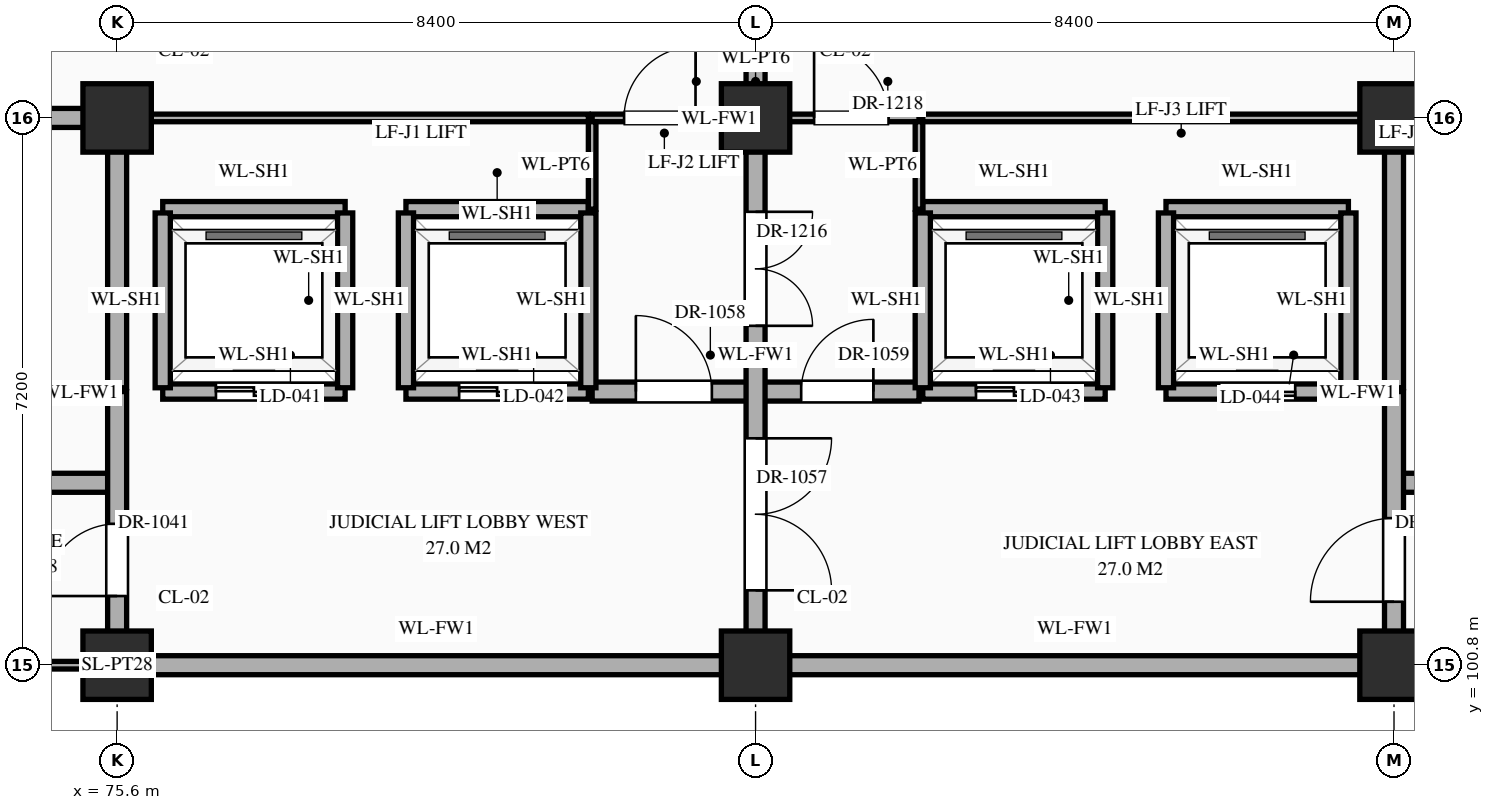
"""IFC4 building model, lengths in metres.
Left out: names, types, materials, properties, quantities, classifications, styles, units other than length and angle.
Written with IfcOpenShell. Run it as: python <this file> out.ifc"""

import sys

from ifc_helpers import new_model, si_unit, direction, frame, frame_2d, origin, origin_2d, place, context, subcontext, project, spatial, rectangle, extrude, element, fill, save


model = new_model("IFC4")
c1 = context("Model", 3, precision=1e-05, world=origin(), true_north=direction((0.0, 1.0)))
c2 = subcontext(c1, "Body", "Model", "MODEL_VIEW")
j1 = project(units=[si_unit("LENGTHUNIT", "METRE"), si_unit("PLANEANGLEUNIT", "RADIAN")], contexts=[c1])
p1 = place(None, origin())
s1 = spatial("IfcSite", under=j1, at=p1, CompositionType="ELEMENT")
p2 = place(p1, origin())
s2 = spatial("IfcBuilding", under=s1, at=p2, CompositionType="ELEMENT")
p3 = place(p2, frame((0.0, 0.0, 5.4)))
s3 = spatial("IfcBuildingStorey", under=s2, at=p3, CompositionType="ELEMENT", Elevation=5.4)
for number, where, z_axis, x_axis in (
    (1, (75.6, 100.8, 0.0), (0.0, 0.0, 1.0), (1.0, 0.0, 0.0)),
    (2, (75.6, 108.0, 0.0), (0.0, 0.0, 1.0), (1.0, 0.0, 0.0)),
    (3, (84.0, 100.8, 0.0), (0.0, 0.0, 1.0), (1.0, 0.0, 0.0)),
    (4, (84.0, 108.0, 0.0), (0.0, 0.0, 1.0), (1.0, 0.0, 0.0)),
    (5, (92.4, 100.8, 0.0), (0.0, 0.0, 1.0), (1.0, 0.0, 0.0)),
    (6, (92.4, 108.0, 0.0), (0.0, 0.0, 1.0), (1.0, 0.0, 0.0)),
):
    element("IfcColumn", number, at=place(p3, frame(where, z_axis=z_axis, x_axis=x_axis)), inside=s3, PredefinedType="COLUMN", context=c2, shape_type="SweptSolid", body=[
        extrude(rectangle(XDim=0.9, YDim=0.9, at=origin_2d()), origin(), (0.0, 0.0, 1.0), 5.4),
    ])
p4 = place(p3, frame((71.45, 100.8, 0.0), z_axis=(0.0, 0.0, 1.0), x_axis=(1.0, 0.0, 0.0)))
e7 = element("IfcWall", 7, at=p4, inside=s3, PredefinedType="STANDARD", context=c2, shape_type="SweptSolid", body=[
    extrude(rectangle(XDim=4.1, YDim=0.1, at=frame_2d((2.05, 0.0))), origin(), (0.0, 0.0, 1.0), 4.27),
])
for number, where, z_axis, x_axis in (
    (8, (75.65, 100.8, 0.0), (0.0, 0.0, 1.0), (1.0, 0.0, 0.0)),
    (9, (84.05, 100.8, 0.0), (0.0, 0.0, 1.0), (1.0, 0.0, 0.0)),
):
    element("IfcWall", number, at=place(p3, frame(where, z_axis=z_axis, x_axis=x_axis)), inside=s3, PredefinedType="STANDARD", context=c2, shape_type="SweptSolid", body=[
        extrude(rectangle(XDim=8.3, YDim=0.25, at=frame_2d((4.15, 0.0))), origin(), (0.0, 0.0, 1.0), 4.27),
    ])
p5 = place(p3, frame((92.45, 100.8, 0.0), z_axis=(0.0, 0.0, 1.0), x_axis=(1.0, 0.0, 0.0)))
e10 = element("IfcWall", 10, at=p5, inside=s3, PredefinedType="STANDARD", context=c2, shape_type="SweptSolid", body=[
    extrude(rectangle(XDim=4.1, YDim=0.1, at=frame_2d((2.05, 0.0))), origin(), (0.0, 0.0, 1.0), 4.27),
])
p6 = place(p3, frame((71.4, 103.2, 0.0), z_axis=(0.0, 0.0, 1.0), x_axis=(1.0, 0.0, 0.0)))
e11 = element("IfcWall", 11, at=p6, inside=s3, PredefinedType="STANDARD", context=c2, shape_type="SweptSolid", body=[
    extrude(rectangle(XDim=4.2, YDim=0.25, at=frame_2d((2.1, 0.0))), origin(), (0.0, 0.0, 1.0), 5.12),
])
p7 = place(p6, frame((1.6, 0.0, 0.0)))
e12 = element("IfcOpeningElement", 12, at=p7, cuts=e11, PredefinedType="OPENING", context=c2, shape_type="SweptSolid", body=[
    extrude(rectangle(XDim=1.0, YDim=2.2, at=frame_2d((0.5, 1.1))), frame((0.0, 0.137, 0.0), z_axis=(0.0, -1.0, 0.0), x_axis=(1.0, 0.0, 0.0)), (0.0, 0.0, 1.0), 0.274),
])
p8 = place(p3, frame((92.4, 103.2, 0.0), z_axis=(0.0, 0.0, 1.0), x_axis=(1.0, 0.0, 0.0)))
e13 = element("IfcWall", 13, at=p8, inside=s3, PredefinedType="STANDARD", context=c2, shape_type="SweptSolid", body=[
    extrude(rectangle(XDim=4.2, YDim=0.25, at=frame_2d((2.1, 0.0))), origin(), (0.0, 0.0, 1.0), 5.12),
])
p9 = place(p8, frame((1.6, 0.0, 0.0)))
e14 = element("IfcOpeningElement", 14, at=p9, cuts=e13, PredefinedType="OPENING", context=c2, shape_type="SweptSolid", body=[
    extrude(rectangle(XDim=1.0, YDim=2.2, at=frame_2d((0.5, 1.1))), frame((0.0, 0.137, 0.0), z_axis=(0.0, -1.0, 0.0), x_axis=(1.0, 0.0, 0.0)), (0.0, 0.0, 1.0), 0.274),
])
p10 = place(p3, frame((76.2, 104.4, 0.0), z_axis=(0.0, 0.0, 1.0), x_axis=(1.0, 0.0, 0.0)))
e15 = element("IfcWall", 15, at=p10, inside=s3, PredefinedType="STANDARD", context=c2, shape_type="SweptSolid", body=[
    extrude(rectangle(XDim=2.4, YDim=0.2, at=frame_2d((1.2, 0.0))), origin(), (0.0, 0.0, 1.0), 5.12),
])
p11 = place(p10, frame((0.7, 0.0, 0.0)))
e16 = element("IfcOpeningElement", 16, at=p11, cuts=e15, PredefinedType="OPENING", context=c2, shape_type="SweptSolid", body=[
    extrude(rectangle(XDim=1.0, YDim=2.15, at=frame_2d((0.5, 1.075))), frame((0.0, 0.112, 0.0), z_axis=(0.0, -1.0, 0.0), x_axis=(1.0, 0.0, 0.0)), (0.0, 0.0, 1.0), 0.224),
])
p12 = place(p3, frame((79.4, 104.4, 0.0), z_axis=(0.0, 0.0, 1.0), x_axis=(1.0, 0.0, 0.0)))
e17 = element("IfcWall", 17, at=p12, inside=s3, PredefinedType="STANDARD", context=c2, shape_type="SweptSolid", body=[
    extrude(rectangle(XDim=2.4, YDim=0.2, at=frame_2d((1.2, 0.0))), origin(), (0.0, 0.0, 1.0), 5.12),
])
p13 = place(p12, frame((0.7, 0.0, 0.0)))
e18 = element("IfcOpeningElement", 18, at=p13, cuts=e17, PredefinedType="OPENING", context=c2, shape_type="SweptSolid", body=[
    extrude(rectangle(XDim=1.0, YDim=2.15, at=frame_2d((0.5, 1.075))), frame((0.0, 0.112, 0.0), z_axis=(0.0, -1.0, 0.0), x_axis=(1.0, 0.0, 0.0)), (0.0, 0.0, 1.0), 0.224),
])
p14 = place(p3, frame((81.85, 104.4, 0.0), z_axis=(0.0, 0.0, 1.0), x_axis=(1.0, 0.0, 0.0)))
e19 = element("IfcWall", 19, at=p14, inside=s3, PredefinedType="STANDARD", context=c2, shape_type="SweptSolid", body=[
    extrude(rectangle(XDim=4.3, YDim=0.25, at=frame_2d((2.15, 0.0))), origin(), (0.0, 0.0, 1.0), 5.12),
])
p15 = place(p14, frame((0.575, 0.0, 0.0)))
e20 = element("IfcOpeningElement", 20, at=p15, cuts=e19, PredefinedType="OPENING", context=c2, shape_type="SweptSolid", body=[
    extrude(rectangle(XDim=1.0, YDim=2.2, at=frame_2d((0.5, 1.1))), frame((0.0, 0.137, 0.0), z_axis=(0.0, -1.0, 0.0), x_axis=(1.0, 0.0, 0.0)), (0.0, 0.0, 1.0), 0.274),
])
p16 = place(p14, frame((2.75, 0.0, 0.0)))
e21 = element("IfcOpeningElement", 21, at=p16, cuts=e19, PredefinedType="OPENING", context=c2, shape_type="SweptSolid", body=[
    extrude(rectangle(XDim=0.95, YDim=2.15, at=frame_2d((0.475, 1.075))), frame((0.0, 0.137, 0.0), z_axis=(0.0, -1.0, 0.0), x_axis=(1.0, 0.0, 0.0)), (0.0, 0.0, 1.0), 0.274),
])
p17 = place(p3, frame((86.2, 104.4, 0.0), z_axis=(0.0, 0.0, 1.0), x_axis=(1.0, 0.0, 0.0)))
e22 = element("IfcWall", 22, at=p17, inside=s3, PredefinedType="STANDARD", context=c2, shape_type="SweptSolid", body=[
    extrude(rectangle(XDim=2.4, YDim=0.2, at=frame_2d((1.2, 0.0))), origin(), (0.0, 0.0, 1.0), 5.12),
])
p18 = place(p17, frame((0.7, 0.0, 0.0)))
e23 = element("IfcOpeningElement", 23, at=p18, cuts=e22, PredefinedType="OPENING", context=c2, shape_type="SweptSolid", body=[
    extrude(rectangle(XDim=1.0, YDim=2.15, at=frame_2d((0.5, 1.075))), frame((0.0, 0.112, 0.0), z_axis=(0.0, -1.0, 0.0), x_axis=(1.0, 0.0, 0.0)), (0.0, 0.0, 1.0), 0.224),
])
p19 = place(p3, frame((89.4, 104.4, 0.0), z_axis=(0.0, 0.0, 1.0), x_axis=(1.0, 0.0, 0.0)))
e24 = element("IfcWall", 24, at=p19, inside=s3, PredefinedType="STANDARD", context=c2, shape_type="SweptSolid", body=[
    extrude(rectangle(XDim=2.4, YDim=0.2, at=frame_2d((1.2, 0.0))), origin(), (0.0, 0.0, 1.0), 5.12),
])
p20 = place(p19, frame((0.7, 0.0, 0.0)))
e25 = element("IfcOpeningElement", 25, at=p20, cuts=e24, PredefinedType="OPENING", context=c2, shape_type="SweptSolid", body=[
    extrude(rectangle(XDim=1.0, YDim=2.15, at=frame_2d((0.5, 1.075))), frame((0.0, 0.112, 0.0), z_axis=(0.0, -1.0, 0.0), x_axis=(1.0, 0.0, 0.0)), (0.0, 0.0, 1.0), 0.224),
])
for number, where, z_axis, x_axis in (
    (26, (76.2, 106.8, 0.0), (0.0, 0.0, 1.0), (1.0, 0.0, 0.0)),
    (27, (79.4, 106.8, 0.0), (0.0, 0.0, 1.0), (1.0, 0.0, 0.0)),
    (28, (86.2, 106.8, 0.0), (0.0, 0.0, 1.0), (1.0, 0.0, 0.0)),
    (29, (89.4, 106.8, 0.0), (0.0, 0.0, 1.0), (1.0, 0.0, 0.0)),
):
    element("IfcWall", number, at=place(p3, frame(where, z_axis=z_axis, x_axis=x_axis)), inside=s3, PredefinedType="STANDARD", context=c2, shape_type="SweptSolid", body=[
        extrude(rectangle(XDim=2.4, YDim=0.2, at=frame_2d((1.2, 0.0))), origin(), (0.0, 0.0, 1.0), 5.12),
    ])
p21 = place(p3, frame((71.4, 108.0, 0.0), z_axis=(0.0, 0.0, 1.0), x_axis=(1.0, 0.0, 0.0)))
e30 = element("IfcWall", 30, at=p21, inside=s3, PredefinedType="STANDARD", context=c2, shape_type="SweptSolid", body=[
    extrude(rectangle(XDim=4.2, YDim=0.25, at=frame_2d((2.1, 0.0))), origin(), (0.0, 0.0, 1.0), 4.27),
])
p22 = place(p21, frame((1.365, 0.0, 0.0)))
e31 = element("IfcOpeningElement", 31, at=p22, cuts=e30, PredefinedType="OPENING", context=c2, shape_type="SweptSolid", body=[
    extrude(rectangle(XDim=1.1, YDim=2.2, at=frame_2d((0.55, 1.1))), frame((0.0, 0.137, 0.0), z_axis=(0.0, -1.0, 0.0), x_axis=(1.0, 0.0, 0.0)), (0.0, 0.0, 1.0), 0.274),
])
p23 = place(p3, frame((75.65, 108.0, 0.0), z_axis=(0.0, 0.0, 1.0), x_axis=(1.0, 0.0, 0.0)))
e32 = element("IfcWall", 32, at=p23, inside=s3, PredefinedType="STANDARD", context=c2, shape_type="SweptSolid", body=[
    extrude(rectangle(XDim=6.15, YDim=0.1, at=frame_2d((3.075, 0.0))), origin(), (0.0, 0.0, 1.0), 4.27),
])
p24 = place(p3, frame((81.85, 108.0, 0.0), z_axis=(0.0, 0.0, 1.0), x_axis=(1.0, 0.0, 0.0)))
e33 = element("IfcWall", 33, at=p24, inside=s3, PredefinedType="STANDARD", context=c2, shape_type="SweptSolid", body=[
    extrude(rectangle(XDim=4.3, YDim=0.1, at=frame_2d((2.15, 0.0))), origin(), (0.0, 0.0, 1.0), 4.27),
])
p25 = place(p24, frame((0.42, 0.0, 0.0)))
e34 = element("IfcOpeningElement", 34, at=p25, cuts=e33, PredefinedType="OPENING", context=c2, shape_type="SweptSolid", body=[
    extrude(rectangle(XDim=0.94, YDim=2.3, at=frame_2d((0.47, 1.15))), frame((0.0, 0.062, 0.0), z_axis=(0.0, -1.0, 0.0), x_axis=(1.0, 0.0, 0.0)), (0.0, 0.0, 1.0), 0.124),
])
p26 = place(p24, frame((2.92, 0.0, 0.0)))
e35 = element("IfcOpeningElement", 35, at=p26, cuts=e33, PredefinedType="OPENING", context=c2, shape_type="SweptSolid", body=[
    extrude(rectangle(XDim=0.98, YDim=2.35, at=frame_2d((0.49, 1.175))), frame((0.0, 0.062, 0.0), z_axis=(0.0, -1.0, 0.0), x_axis=(1.0, 0.0, 0.0)), (0.0, 0.0, 1.0), 0.124),
])
p27 = place(p3, frame((86.2, 108.0, 0.0), z_axis=(0.0, 0.0, 1.0), x_axis=(1.0, 0.0, 0.0)))
e36 = element("IfcWall", 36, at=p27, inside=s3, PredefinedType="STANDARD", context=c2, shape_type="SweptSolid", body=[
    extrude(rectangle(XDim=6.15, YDim=0.1, at=frame_2d((3.075, 0.0))), origin(), (0.0, 0.0, 1.0), 4.27),
])
p28 = place(p3, frame((92.4, 108.0, 0.0), z_axis=(0.0, 0.0, 1.0), x_axis=(1.0, 0.0, 0.0)))
e37 = element("IfcWall", 37, at=p28, inside=s3, PredefinedType="STANDARD", context=c2, shape_type="SweptSolid", body=[
    extrude(rectangle(XDim=4.2, YDim=0.25, at=frame_2d((2.1, 0.0))), origin(), (0.0, 0.0, 1.0), 4.27),
])
p29 = place(p28, frame((1.785, 0.0, 0.0)))
e38 = element("IfcOpeningElement", 38, at=p29, cuts=e37, PredefinedType="OPENING", context=c2, shape_type="SweptSolid", body=[
    extrude(rectangle(XDim=1.0, YDim=2.2, at=frame_2d((0.5, 1.1))), frame((0.0, 0.137, 0.0), z_axis=(0.0, -1.0, 0.0), x_axis=(1.0, 0.0, 0.0)), (0.0, 0.0, 1.0), 0.274),
])
p30 = place(p3, frame((75.6, 100.8, 0.0), z_axis=(0.0, 0.0, 1.0), x_axis=(0.0, 1.0, 0.0)))
e39 = element("IfcWall", 39, at=p30, inside=s3, PredefinedType="STANDARD", context=c2, shape_type="SweptSolid", body=[
    extrude(rectangle(XDim=3.6, YDim=0.25, at=frame_2d((1.8, 0.0))), origin(), (0.0, 0.0, 1.0), 4.37),
])
p31 = place(p30, frame((0.91, 0.0, 0.0)))
e40 = element("IfcOpeningElement", 40, at=p31, cuts=e39, PredefinedType="OPENING", context=c2, shape_type="SweptSolid", body=[
    extrude(rectangle(XDim=0.95, YDim=2.15, at=frame_2d((0.475, 1.075))), frame((0.0, 0.137, 0.0), z_axis=(0.0, -1.0, 0.0), x_axis=(1.0, 0.0, 0.0)), (0.0, 0.0, 1.0), 0.274),
])
p32 = place(p3, frame((75.6, 104.45, 0.0), z_axis=(0.0, 0.0, 1.0), x_axis=(0.0, 1.0, 0.0)))
e41 = element("IfcWall", 41, at=p32, inside=s3, PredefinedType="STANDARD", context=c2, shape_type="SweptSolid", body=[
    extrude(rectangle(XDim=3.5, YDim=0.25, at=frame_2d((1.75, 0.0))), origin(), (0.0, 0.0, 1.0), 4.37),
])
for number, where, z_axis, x_axis in (
    (42, (76.2, 104.45, 0.0), (0.0, 0.0, 1.0), (0.0, 1.0, 0.0)),
    (43, (78.6, 104.45, 0.0), (0.0, 0.0, 1.0), (0.0, 1.0, 0.0)),
    (44, (79.4, 104.45, 0.0), (0.0, 0.0, 1.0), (0.0, 1.0, 0.0)),
    (45, (81.8, 104.45, 0.0), (0.0, 0.0, 1.0), (0.0, 1.0, 0.0)),
):
    element("IfcWall", number, at=place(p3, frame(where, z_axis=z_axis, x_axis=x_axis)), inside=s3, PredefinedType="STANDARD", context=c2, shape_type="SweptSolid", body=[
        extrude(rectangle(XDim=2.3, YDim=0.2, at=frame_2d((1.15, 0.0))), origin(), (0.0, 0.0, 1.0), 5.12),
    ])
p33 = place(p3, frame((81.85, 106.8, 0.0), z_axis=(0.0, 0.0, 1.0), x_axis=(0.0, 1.0, 0.0)))
e46 = element("IfcWall", 46, at=p33, inside=s3, PredefinedType="STANDARD", context=c2, shape_type="SweptSolid", body=[
    extrude(rectangle(XDim=1.15, YDim=0.1, at=frame_2d((0.575, 0.0))), origin(), (0.0, 0.0, 1.0), 5.12),
])
p34 = place(p3, frame((84.0, 100.8, 0.0), z_axis=(0.0, 0.0, 1.0), x_axis=(0.0, 1.0, 0.0)))
e47 = element("IfcWall", 47, at=p34, inside=s3, PredefinedType="STANDARD", context=c2, shape_type="SweptSolid", body=[
    extrude(rectangle(XDim=14.36, YDim=0.25, at=frame_2d((7.18, 0.0))), origin(), (0.0, 0.0, 1.0), 4.37),
])
p35 = place(p34, frame((0.985, 0.0, 0.0)))
e48 = element("IfcOpeningElement", 48, at=p35, cuts=e47, PredefinedType="OPENING", context=c2, shape_type="SweptSolid", body=[
    extrude(rectangle(XDim=2.0, YDim=2.4, at=frame_2d((1.0, 1.2))), frame((0.0, 0.137, 0.0), z_axis=(0.0, -1.0, 0.0), x_axis=(1.0, 0.0, 0.0)), (0.0, 0.0, 1.0), 0.274),
])
p36 = place(p34, frame((4.465, 0.0, 0.0)))
e49 = element("IfcOpeningElement", 49, at=p36, cuts=e47, PredefinedType="OPENING", context=c2, shape_type="SweptSolid", body=[
    extrude(rectangle(XDim=1.5, YDim=2.25, at=frame_2d((0.75, 1.125))), frame((0.0, 0.137, 0.0), z_axis=(0.0, -1.0, 0.0), x_axis=(1.0, 0.0, 0.0)), (0.0, 0.0, 1.0), 0.274),
])
p37 = place(p34, frame((8.035, 0.0, 0.0)))
e50 = element("IfcOpeningElement", 50, at=p37, cuts=e47, PredefinedType="OPENING", context=c2, shape_type="SweptSolid", body=[
    extrude(rectangle(XDim=1.1, YDim=2.2, at=frame_2d((0.55, 1.1))), frame((0.0, 0.137, 0.0), z_axis=(0.0, -1.0, 0.0), x_axis=(1.0, 0.0, 0.0)), (0.0, 0.0, 1.0), 0.274),
])
p38 = place(p3, frame((86.15, 106.8, 0.0), z_axis=(0.0, 0.0, 1.0), x_axis=(0.0, 1.0, 0.0)))
e51 = element("IfcWall", 51, at=p38, inside=s3, PredefinedType="STANDARD", context=c2, shape_type="SweptSolid", body=[
    extrude(rectangle(XDim=1.15, YDim=0.1, at=frame_2d((0.575, 0.0))), origin(), (0.0, 0.0, 1.0), 5.12),
])
for number, where, z_axis, x_axis in (
    (52, (86.2, 104.45, 0.0), (0.0, 0.0, 1.0), (0.0, 1.0, 0.0)),
    (53, (88.6, 104.45, 0.0), (0.0, 0.0, 1.0), (0.0, 1.0, 0.0)),
    (54, (89.4, 104.45, 0.0), (0.0, 0.0, 1.0), (0.0, 1.0, 0.0)),
    (55, (91.8, 104.45, 0.0), (0.0, 0.0, 1.0), (0.0, 1.0, 0.0)),
):
    element("IfcWall", number, at=place(p3, frame(where, z_axis=z_axis, x_axis=x_axis)), inside=s3, PredefinedType="STANDARD", context=c2, shape_type="SweptSolid", body=[
        extrude(rectangle(XDim=2.3, YDim=0.2, at=frame_2d((1.15, 0.0))), origin(), (0.0, 0.0, 1.0), 5.12),
    ])
p39 = place(p3, frame((92.4, 100.8, 0.0), z_axis=(0.0, 0.0, 1.0), x_axis=(0.0, 1.0, 0.0)))
e56 = element("IfcWall", 56, at=p39, inside=s3, PredefinedType="STANDARD", context=c2, shape_type="SweptSolid", body=[
    extrude(rectangle(XDim=3.6, YDim=0.25, at=frame_2d((1.8, 0.0))), origin(), (0.0, 0.0, 1.0), 4.37),
])
p40 = place(p39, frame((0.835, 0.0, 0.0)))
e57 = element("IfcOpeningElement", 57, at=p40, cuts=e56, PredefinedType="OPENING", context=c2, shape_type="SweptSolid", body=[
    extrude(rectangle(XDim=1.1, YDim=2.2, at=frame_2d((0.55, 1.1))), frame((0.0, 0.137, 0.0), z_axis=(0.0, -1.0, 0.0), x_axis=(1.0, 0.0, 0.0)), (0.0, 0.0, 1.0), 0.274),
])
p41 = place(p3, frame((92.4, 104.45, 0.0), z_axis=(0.0, 0.0, 1.0), x_axis=(0.0, 1.0, 0.0)))
e58 = element("IfcWall", 58, at=p41, inside=s3, PredefinedType="STANDARD", context=c2, shape_type="SweptSolid", body=[
    extrude(rectangle(XDim=3.5, YDim=0.25, at=frame_2d((1.75, 0.0))), origin(), (0.0, 0.0, 1.0), 4.37),
])
p42 = place(p11, origin())
e59 = element("IfcDoor", 59, at=p42, inside=s3, OperationType="DOUBLE_DOOR_SLIDING", PredefinedType="DOOR", context=c2, shape_type="SweptSolid", body=[
    extrude(rectangle(XDim=1.0, YDim=2.15, at=frame_2d((0.5, 1.075))), frame((0.0, 0.025, 0.0), z_axis=(0.0, -1.0, 0.0), x_axis=(1.0, 0.0, 0.0)), (0.0, 0.0, 1.0), 0.05),
])
fill(e16, e59)
p43 = place(p13, origin())
e60 = element("IfcDoor", 60, at=p43, inside=s3, OperationType="DOUBLE_DOOR_SLIDING", PredefinedType="DOOR", context=c2, shape_type="SweptSolid", body=[
    extrude(rectangle(XDim=1.0, YDim=2.15, at=frame_2d((0.5, 1.075))), frame((0.0, 0.025, 0.0), z_axis=(0.0, -1.0, 0.0), x_axis=(1.0, 0.0, 0.0)), (0.0, 0.0, 1.0), 0.05),
])
fill(e18, e60)
p44 = place(p18, origin())
e61 = element("IfcDoor", 61, at=p44, inside=s3, OperationType="DOUBLE_DOOR_SLIDING", PredefinedType="DOOR", context=c2, shape_type="SweptSolid", body=[
    extrude(rectangle(XDim=1.0, YDim=2.15, at=frame_2d((0.5, 1.075))), frame((0.0, 0.025, 0.0), z_axis=(0.0, -1.0, 0.0), x_axis=(1.0, 0.0, 0.0)), (0.0, 0.0, 1.0), 0.05),
])
fill(e23, e61)
p45 = place(p20, origin())
e62 = element("IfcDoor", 62, at=p45, inside=s3, OperationType="DOUBLE_DOOR_SLIDING", PredefinedType="DOOR", context=c2, shape_type="SweptSolid", body=[
    extrude(rectangle(XDim=1.0, YDim=2.15, at=frame_2d((0.5, 1.075))), frame((0.0, 0.025, 0.0), z_axis=(0.0, -1.0, 0.0), x_axis=(1.0, 0.0, 0.0)), (0.0, 0.0, 1.0), 0.05),
])
fill(e25, e62)
p46 = place(p31, origin())
e63 = element("IfcDoor", 63, at=p46, inside=s3, OperationType="SINGLE_SWING_LEFT", PredefinedType="DOOR", context=c2, shape_type="SweptSolid", body=[
    extrude(rectangle(XDim=0.95, YDim=2.15, at=frame_2d((0.475, 1.075))), frame((0.0, 0.025, 0.0), z_axis=(0.0, -1.0, 0.0), x_axis=(1.0, 0.0, 0.0)), (0.0, 0.0, 1.0), 0.05),
])
fill(e40, e63)
p47 = place(p40, origin())
e64 = element("IfcDoor", 64, at=p47, inside=s3, OperationType="SINGLE_SWING_LEFT", PredefinedType="DOOR", context=c2, shape_type="SweptSolid", body=[
    extrude(rectangle(XDim=1.1, YDim=2.2, at=frame_2d((0.55, 1.1))), frame((0.0, 0.025, 0.0), z_axis=(0.0, -1.0, 0.0), x_axis=(1.0, 0.0, 0.0)), (0.0, 0.0, 1.0), 0.05),
])
fill(e57, e64)
p48 = place(p35, frame((2.0, 0.0, 0.0), z_axis=(0.0, 0.0, 1.0), x_axis=(-1.0, 0.0, 0.0)))
e65 = element("IfcDoor", 65, at=p48, inside=s3, OperationType="DOUBLE_DOOR_SINGLE_SWING", PredefinedType="DOOR", context=c2, shape_type="SweptSolid", body=[
    extrude(rectangle(XDim=2.0, YDim=2.4, at=frame_2d((1.0, 1.2))), frame((0.0, 0.025, 0.0), z_axis=(0.0, -1.0, 0.0), x_axis=(1.0, 0.0, 0.0)), (0.0, 0.0, 1.0), 0.05),
])
fill(e48, e65)
p49 = place(p15, origin())
e66 = element("IfcDoor", 66, at=p49, inside=s3, OperationType="SINGLE_SWING_LEFT", PredefinedType="DOOR", context=c2, shape_type="SweptSolid", body=[
    extrude(rectangle(XDim=1.0, YDim=2.2, at=frame_2d((0.5, 1.1))), frame((0.0, 0.025, 0.0), z_axis=(0.0, -1.0, 0.0), x_axis=(1.0, 0.0, 0.0)), (0.0, 0.0, 1.0), 0.05),
])
fill(e20, e66)
p50 = place(p16, origin())
e67 = element("IfcDoor", 67, at=p50, inside=s3, OperationType="SINGLE_SWING_RIGHT", PredefinedType="DOOR", context=c2, shape_type="SweptSolid", body=[
    extrude(rectangle(XDim=0.95, YDim=2.15, at=frame_2d((0.475, 1.075))), frame((0.0, 0.025, 0.0), z_axis=(0.0, -1.0, 0.0), x_axis=(1.0, 0.0, 0.0)), (0.0, 0.0, 1.0), 0.05),
])
fill(e21, e67)
p51 = place(p36, frame((1.5, 0.0, 0.0), z_axis=(0.0, 0.0, 1.0), x_axis=(-1.0, 0.0, 0.0)))
e68 = element("IfcDoor", 68, at=p51, inside=s3, OperationType="DOUBLE_DOOR_SINGLE_SWING", PredefinedType="DOOR", context=c2, shape_type="SweptSolid", body=[
    extrude(rectangle(XDim=1.5, YDim=2.25, at=frame_2d((0.75, 1.125))), frame((0.0, 0.025, 0.0), z_axis=(0.0, -1.0, 0.0), x_axis=(1.0, 0.0, 0.0)), (0.0, 0.0, 1.0), 0.05),
])
fill(e49, e68)
p52 = place(p25, origin())
e69 = element("IfcDoor", 69, at=p52, inside=s3, OperationType="SINGLE_SWING_RIGHT", PredefinedType="DOOR", context=c2, shape_type="SweptSolid", body=[
    extrude(rectangle(XDim=0.94, YDim=2.3, at=frame_2d((0.47, 1.15))), frame((0.0, 0.025, 0.0), z_axis=(0.0, -1.0, 0.0), x_axis=(1.0, 0.0, 0.0)), (0.0, 0.0, 1.0), 0.05),
])
fill(e34, e69)
p53 = place(p26, origin())
e70 = element("IfcDoor", 70, at=p53, inside=s3, OperationType="SINGLE_SWING_LEFT", PredefinedType="DOOR", context=c2, shape_type="SweptSolid", body=[
    extrude(rectangle(XDim=0.98, YDim=2.35, at=frame_2d((0.49, 1.175))), frame((0.0, 0.025, 0.0), z_axis=(0.0, -1.0, 0.0), x_axis=(1.0, 0.0, 0.0)), (0.0, 0.0, 1.0), 0.05),
])
fill(e35, e70)
p54 = place(p37, origin())
e71 = element("IfcDoor", 71, at=p54, inside=s3, OperationType="SINGLE_SWING_RIGHT", PredefinedType="DOOR", context=c2, shape_type="SweptSolid", body=[
    extrude(rectangle(XDim=1.1, YDim=2.2, at=frame_2d((0.55, 1.1))), frame((0.0, 0.025, 0.0), z_axis=(0.0, -1.0, 0.0), x_axis=(1.0, 0.0, 0.0)), (0.0, 0.0, 1.0), 0.05),
])
fill(e50, e71)
save(model, sys.argv[1])
